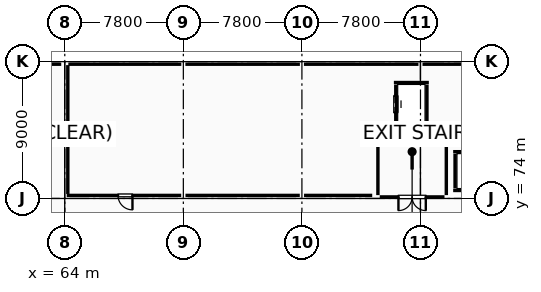
"""IFC4 building model, lengths in metres.
Left out: names, types, materials, properties, quantities, classifications, styles, units other than length and angle.
Written with IfcOpenShell. Run it as: python <this file> out.ifc"""

import sys

from ifc_helpers import new_model, si_unit, direction, frame, frame_2d, origin, origin_2d, place, context, subcontext, project, spatial, rectangle, hollow_rectangle, i_section, extrude, element, fill, save


model = new_model("IFC4")
c1 = context("Model", 3, precision=1e-05, world=origin(), true_north=direction((0.0, 1.0)))
c2 = subcontext(c1, "Body", "Model", "MODEL_VIEW")
j1 = project(units=[si_unit("LENGTHUNIT", "METRE"), si_unit("PLANEANGLEUNIT", "RADIAN")], contexts=[c1])
p1 = place(None, origin())
s1 = spatial("IfcSite", under=j1, at=p1, CompositionType="ELEMENT")
p2 = place(p1, origin())
s2 = spatial("IfcBuilding", under=s1, at=p2, CompositionType="ELEMENT")
p3 = place(p2, frame((0.0, 0.0, 5.4)))
s3 = spatial("IfcBuildingStorey", under=s2, at=p3, CompositionType="ELEMENT", Elevation=5.4)
p4 = place(p3, frame((64.0, 74.0, 0.0), z_axis=(0.0, 0.0, 1.0), x_axis=(1.0, 0.0, 0.0)))
e1 = element("IfcColumn", 1, at=p4, inside=s3, PredefinedType="COLUMN", context=c2, shape_type="SweptSolid", body=[
    extrude(i_section(OverallWidth=0.25, OverallDepth=0.45, WebThickness=0.011, FlangeThickness=0.014, FilletRadius=0.015, at=origin_2d()), origin(), (0.0, 0.0, 1.0), 4.8),
])
p5 = place(p3, frame((64.0, 83.0, 0.0), z_axis=(0.0, 0.0, 1.0), x_axis=(1.0, 0.0, 0.0)))
e2 = element("IfcColumn", 2, at=p5, inside=s3, PredefinedType="COLUMN", context=c2, shape_type="SweptSolid", body=[
    extrude(hollow_rectangle(XDim=0.45, YDim=0.45, WallThickness=0.02, at=origin_2d()), origin(), (0.0, 0.0, 1.0), 4.8),
])
for number, where, z_axis, x_axis in (
    (3, (71.8, 74.0, 0.0), (0.0, 0.0, 1.0), (1.0, 0.0, 0.0)),
    (4, (71.8, 83.0, 0.0), (0.0, 0.0, 1.0), (1.0, 0.0, 0.0)),
    (5, (79.6, 74.0, 0.0), (0.0, 0.0, 1.0), (1.0, 0.0, 0.0)),
    (6, (79.6, 83.0, 0.0), (0.0, 0.0, 1.0), (1.0, 0.0, 0.0)),
    (7, (87.4, 83.0, 0.0), (0.0, 0.0, 1.0), (1.0, 0.0, 0.0)),
):
    element("IfcColumn", number, at=place(p3, frame(where, z_axis=z_axis, x_axis=x_axis)), inside=s3, PredefinedType="COLUMN", context=c2, shape_type="SweptSolid", body=[
        extrude(i_section(OverallWidth=0.25, OverallDepth=0.45, WebThickness=0.011, FlangeThickness=0.014, FilletRadius=0.015, at=origin_2d()), origin(), (0.0, 0.0, 1.0), 4.8),
    ])
p6 = place(p3, frame((62.804, 82.83, 0.0), z_axis=(0.0, 0.0, 1.0), x_axis=(1.0, 0.0, 0.0)))
e8 = element("IfcWall", 8, at=p6, inside=s3, PredefinedType="STANDARD", context=c2, shape_type="SweptSolid", body=[
    extrude(rectangle(XDim=0.963, YDim=0.3, at=frame_2d((0.481, 0.0))), origin(), (0.0, 0.0, 1.0), 4.54),
])
p7 = place(p3, frame((64.233, 82.83, 0.0), z_axis=(0.0, 0.0, 1.0), x_axis=(1.0, 0.0, 0.0)))
e9 = element("IfcWall", 9, at=p7, inside=s3, PredefinedType="STANDARD", context=c2, shape_type="SweptSolid", body=[
    extrude(rectangle(XDim=7.434, YDim=0.3, at=frame_2d((3.717, 0.0))), origin(), (0.0, 0.0, 1.0), 3.875),
])
p8 = place(p3, frame((71.933, 82.83, 0.0), z_axis=(0.0, 0.0, 1.0), x_axis=(1.0, 0.0, 0.0)))
e10 = element("IfcWall", 10, at=p8, inside=s3, PredefinedType="STANDARD", context=c2, shape_type="SweptSolid", body=[
    extrude(rectangle(XDim=7.534, YDim=0.3, at=frame_2d((3.767, 0.0))), origin(), (0.0, 0.0, 1.0), 4.075),
])
p9 = place(p3, frame((79.733, 82.83, 0.0), z_axis=(0.0, 0.0, 1.0), x_axis=(1.0, 0.0, 0.0)))
e11 = element("IfcWall", 11, at=p9, inside=s3, PredefinedType="STANDARD", context=c2, shape_type="SweptSolid", body=[
    extrude(rectangle(XDim=7.534, YDim=0.3, at=frame_2d((3.767, 0.0))), origin(), (0.0, 0.0, 1.0), 3.925),
])
p10 = place(p3, frame((87.533, 82.83, 0.0), z_axis=(0.0, 0.0, 1.0), x_axis=(1.0, 0.0, 0.0)))
e12 = element("IfcWall", 12, at=p10, inside=s3, PredefinedType="STANDARD", context=c2, shape_type="SweptSolid", body=[
    extrude(rectangle(XDim=5.863, YDim=0.3, at=frame_2d((2.932, 0.0))), origin(), (0.0, 0.0, 1.0), 4.54),
])
p11 = place(p3, frame((89.55, 74.525, 0.0), z_axis=(0.0, 0.0, 1.0), x_axis=(1.0, 0.0, 0.0)))
e13 = element("IfcWall", 13, at=p11, inside=s3, PredefinedType="STANDARD", context=c2, shape_type="SweptSolid", body=[
    extrude(rectangle(XDim=2.5, YDim=0.25, at=frame_2d((1.25, 0.0))), origin(), (0.0, 0.0, 1.0), 4.53),
])
p12 = place(p11, frame((0.65, 0.0, 0.0)))
e14 = element("IfcOpeningElement", 14, at=p12, cuts=e13, PredefinedType="OPENING", context=c2, shape_type="SweptSolid", body=[
    extrude(rectangle(XDim=1.2, YDim=2.05, at=frame_2d((0.6, 1.025))), frame((0.0, 0.135, 0.0), z_axis=(0.0, -1.0, 0.0), x_axis=(1.0, 0.0, 0.0)), (0.0, 0.0, 1.0), 0.27),
])
p13 = place(p3, frame((92.05, 77.075, 0.0), z_axis=(0.0, 0.0, 1.0), x_axis=(-1.0, 0.0, 0.0)))
e15 = element("IfcWall", 15, at=p13, inside=s3, PredefinedType="STANDARD", context=c2, shape_type="SweptSolid", body=[
    extrude(rectangle(XDim=2.5, YDim=0.25, at=frame_2d((1.25, 0.0))), origin(), (0.0, 0.0, 1.0), 4.53),
])
p14 = place(p3, frame((89.675, 76.94, 0.0), z_axis=(0.0, 0.0, 1.0), x_axis=(0.0, -1.0, 0.0)))
e16 = element("IfcWall", 16, at=p14, inside=s3, PredefinedType="STANDARD", context=c2, shape_type="SweptSolid", body=[
    extrude(rectangle(XDim=2.28, YDim=0.25, at=frame_2d((1.14, 0.0))), origin(), (0.0, 0.0, 1.0), 4.53),
])
for number, where, z_axis, x_axis in (
    (17, (85.65, 78.775, 0.0), (0.0, 0.0, 1.0), (1.0, 0.0, 0.0)),
    (18, (87.95, 81.625, 0.0), (0.0, 0.0, 1.0), (-1.0, 0.0, 0.0)),
):
    element("IfcWall", number, at=place(p3, frame(where, z_axis=z_axis, x_axis=x_axis)), inside=s3, PredefinedType="STANDARD", context=c2, shape_type="SweptSolid", body=[
        extrude(rectangle(XDim=2.3, YDim=0.25, at=frame_2d((1.15, 0.0))), origin(), (0.0, 0.0, 1.0), 4.53),
    ])
p15 = place(p3, frame((87.825, 78.91, 0.0), z_axis=(0.0, 0.0, 1.0), x_axis=(0.0, 1.0, 0.0)))
e19 = element("IfcWall", 19, at=p15, inside=s3, PredefinedType="STANDARD", context=c2, shape_type="SweptSolid", body=[
    extrude(rectangle(XDim=2.58, YDim=0.25, at=frame_2d((1.29, 0.0))), origin(), (0.0, 0.0, 1.0), 4.53),
])
p16 = place(p3, frame((85.775, 81.49, 0.0), z_axis=(0.0, 0.0, 1.0), x_axis=(0.0, -1.0, 0.0)))
e20 = element("IfcWall", 20, at=p16, inside=s3, PredefinedType="STANDARD", context=c2, shape_type="SweptSolid", body=[
    extrude(rectangle(XDim=2.58, YDim=0.25, at=frame_2d((1.29, 0.0))), origin(), (0.0, 0.0, 1.0), 4.53),
])
p17 = place(p16, frame((0.74, 0.0, 0.0)))
e21 = element("IfcOpeningElement", 21, at=p17, cuts=e20, PredefinedType="OPENING", context=c2, shape_type="SweptSolid", body=[
    extrude(rectangle(XDim=1.1, YDim=2.15, at=frame_2d((0.55, 1.075))), frame((0.0, 0.135, 0.0), z_axis=(0.0, -1.0, 0.0), x_axis=(1.0, 0.0, 0.0)), (0.0, 0.0, 1.0), 0.27),
])
p18 = place(p3, frame((84.6, 74.22, 0.0), z_axis=(0.0, 0.0, 1.0), x_axis=(0.0, 1.0, 0.0)))
e22 = element("IfcWall", 22, at=p18, inside=s3, PredefinedType="PARTITIONING", context=c2, shape_type="SweptSolid", body=[
    extrude(rectangle(XDim=3.36, YDim=0.2, at=frame_2d((1.68, 0.0))), origin(), (0.0, 0.0, 1.0), 4.53),
])
p19 = place(p3, frame((84.72, 77.7, 0.0), z_axis=(0.0, 0.0, 1.0), x_axis=(1.0, 0.0, 0.0)))
e23 = element("IfcWall", 23, at=p19, inside=s3, PredefinedType="PARTITIONING", context=c2, shape_type="SweptSolid", body=[
    extrude(rectangle(XDim=4.26, YDim=0.2, at=frame_2d((2.13, 0.0))), origin(), (0.0, 0.0, 1.0), 4.53),
])
p20 = place(p3, frame((89.1, 77.58, 0.0), z_axis=(0.0, 0.0, 1.0), x_axis=(0.0, -1.0, 0.0)))
e24 = element("IfcWall", 24, at=p20, inside=s3, PredefinedType="PARTITIONING", context=c2, shape_type="SweptSolid", body=[
    extrude(rectangle(XDim=3.36, YDim=0.2, at=frame_2d((1.68, 0.0))), origin(), (0.0, 0.0, 1.0), 4.53),
])
p21 = place(p3, frame((88.98, 74.1, 0.0), z_axis=(0.0, 0.0, 1.0), x_axis=(-1.0, 0.0, 0.0)))
e25 = element("IfcWall", 25, at=p21, inside=s3, PredefinedType="PARTITIONING", context=c2, shape_type="SweptSolid", body=[
    extrude(rectangle(XDim=4.26, YDim=0.2, at=frame_2d((2.13, 0.0))), origin(), (0.0, 0.0, 1.0), 4.53),
])
p22 = place(p21, frame((1.23, 0.0, 0.0)))
e26 = element("IfcOpeningElement", 26, at=p22, cuts=e25, PredefinedType="OPENING", context=c2, shape_type="SweptSolid", body=[
    extrude(rectangle(XDim=1.8, YDim=2.15, at=frame_2d((0.9, 1.075))), frame((0.0, 0.11, 0.0), z_axis=(0.0, -1.0, 0.0), x_axis=(1.0, 0.0, 0.0)), (0.0, 0.0, 1.0), 0.22),
])
p23 = place(p3, frame((64.2, 74.295, 0.0), z_axis=(0.0, 0.0, 1.0), x_axis=(0.0, 1.0, 0.0)))
e27 = element("IfcWall", 27, at=p23, inside=s3, PredefinedType="PARTITIONING", context=c2, shape_type="SweptSolid", body=[
    extrude(rectangle(XDim=8.476, YDim=0.15, at=frame_2d((4.238, 0.0))), origin(), (0.0, 0.0, 1.0), 4.12),
])
p24 = place(p3, frame((84.225, 74.2, 0.0), z_axis=(0.0, 0.0, 1.0), x_axis=(-1.0, 0.0, 0.0)))
e28 = element("IfcWall", 28, at=p24, inside=s3, PredefinedType="PARTITIONING", context=c2, shape_type="SweptSolid", body=[
    extrude(rectangle(XDim=4.485, YDim=0.15, at=frame_2d((2.243, 0.0))), origin(), (0.0, 0.0, 1.0), 4.53),
])
p25 = place(p3, frame((79.46, 74.2, 0.0), z_axis=(0.0, 0.0, 1.0), x_axis=(-1.0, 0.0, 0.0)))
e29 = element("IfcWall", 29, at=p25, inside=s3, PredefinedType="PARTITIONING", context=c2, shape_type="SweptSolid", body=[
    extrude(rectangle(XDim=7.52, YDim=0.15, at=frame_2d((3.76, 0.0))), origin(), (0.0, 0.0, 1.0), 3.67),
])
p26 = place(p3, frame((71.66, 74.2, 0.0), z_axis=(0.0, 0.0, 1.0), x_axis=(-1.0, 0.0, 0.0)))
e30 = element("IfcWall", 30, at=p26, inside=s3, PredefinedType="PARTITIONING", context=c2, shape_type="SweptSolid", body=[
    extrude(rectangle(XDim=7.531, YDim=0.15, at=frame_2d((3.766, 0.0))), origin(), (0.0, 0.0, 1.0), 3.52),
])
p27 = place(p26, frame((3.207, 0.0, 0.0)))
e31 = element("IfcOpeningElement", 31, at=p27, cuts=e30, PredefinedType="OPENING", context=c2, shape_type="SweptSolid", body=[
    extrude(rectangle(XDim=0.95, YDim=2.15, at=frame_2d((0.475, 1.075))), frame((0.0, 0.085, 0.0), z_axis=(0.0, -1.0, 0.0), x_axis=(1.0, 0.0, 0.0)), (0.0, 0.0, 1.0), 0.17),
])
p28 = place(p17, origin())
e32 = element("IfcDoor", 32, at=p28, inside=s3, OperationType="DOUBLE_DOOR_SLIDING", PredefinedType="DOOR", context=c2, shape_type="SweptSolid", body=[
    extrude(rectangle(XDim=1.1, YDim=2.15, at=frame_2d((0.55, 1.075))), frame((0.0, 0.025, 0.0), z_axis=(0.0, -1.0, 0.0), x_axis=(1.0, 0.0, 0.0)), (0.0, 0.0, 1.0), 0.05),
])
fill(e21, e32)
p29 = place(p22, origin())
e33 = element("IfcDoor", 33, at=p29, inside=s3, OperationType="DOUBLE_DOOR_SINGLE_SWING", PredefinedType="DOOR", context=c2, shape_type="SweptSolid", body=[
    extrude(rectangle(XDim=1.8, YDim=2.15, at=frame_2d((0.9, 1.075))), frame((0.0, 0.025, 0.0), z_axis=(0.0, -1.0, 0.0), x_axis=(1.0, 0.0, 0.0)), (0.0, 0.0, 1.0), 0.05),
])
fill(e26, e33)
p30 = place(p27, origin())
e34 = element("IfcDoor", 34, at=p30, inside=s3, OperationType="SINGLE_SWING_LEFT", PredefinedType="DOOR", context=c2, shape_type="SweptSolid", body=[
    extrude(rectangle(XDim=0.95, YDim=2.15, at=frame_2d((0.475, 1.075))), frame((0.0, 0.025, 0.0), z_axis=(0.0, -1.0, 0.0), x_axis=(1.0, 0.0, 0.0)), (0.0, 0.0, 1.0), 0.05),
])
fill(e31, e34)
save(model, sys.argv[1])
